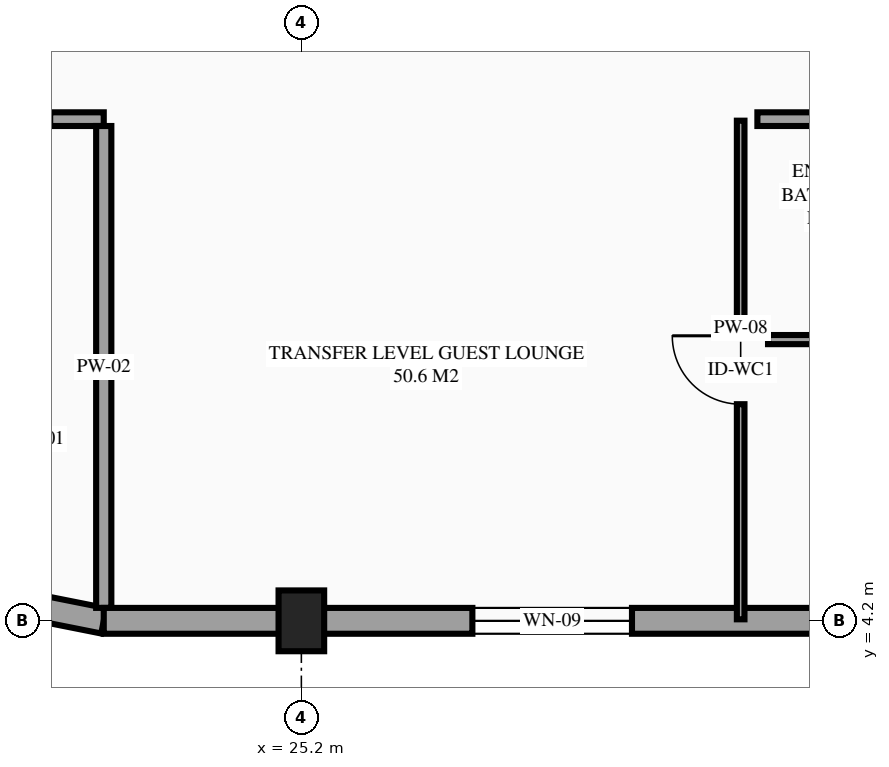
"""IFC4 building model, lengths in metres.
Left out: names, types, materials, properties, quantities, classifications, styles, units other than length and angle.
Written with IfcOpenShell. Run it as: python <this file> out.ifc"""

import sys

from ifc_helpers import new_model, si_unit, direction, frame, frame_2d, origin, origin_2d, place, context, subcontext, project, spatial, rectangle, extrude, element, fill, save


model = new_model("IFC4")
c1 = context("Model", 3, precision=1e-05, world=origin(), true_north=direction((0.0, 1.0)))
c2 = subcontext(c1, "Body", "Model", "MODEL_VIEW")
j1 = project(units=[si_unit("LENGTHUNIT", "METRE"), si_unit("PLANEANGLEUNIT", "RADIAN")], contexts=[c1])
p1 = place(None, origin())
s1 = spatial("IfcSite", under=j1, at=p1, CompositionType="ELEMENT")
p2 = place(p1, origin())
s2 = spatial("IfcBuilding", under=s1, at=p2, CompositionType="ELEMENT")
p3 = place(p2, frame((0.0, 0.0, 18.3)))
s3 = spatial("IfcBuildingStorey", under=s2, at=p3, CompositionType="ELEMENT", Elevation=18.3)
p4 = place(p3, frame((25.2, 4.2, 0.0), z_axis=(0.0, 0.0, 1.0), x_axis=(1.0, 0.0, 0.0)))
e1 = element("IfcColumn", 1, at=p4, inside=s3, PredefinedType="COLUMN", context=c2, shape_type="SweptSolid", body=[
    extrude(rectangle(XDim=0.6, YDim=0.8, at=origin_2d()), origin(), (0.0, 0.0, 1.0), 3.6),
])
p5 = place(p3, frame((20.38, 4.642, 0.0), z_axis=(0.0, 0.0, 1.0), x_axis=(0.98077519094, -0.195141038321, 0.0)))
e2 = element("IfcWall", 2, at=p5, inside=s3, PredefinedType="STANDARD", context=c2, shape_type="SweptSolid", body=[
    extrude(rectangle(XDim=2.263, YDim=0.34, at=frame_2d((1.132, 0.0))), origin(), (0.0, 0.0, 1.0), 3.126),
])
p6 = place(p3, frame((25.2, 4.2, 0.0), z_axis=(0.0, 0.0, 1.0), x_axis=(1.0, 0.0, 0.0)))
e3 = element("IfcWall", 3, at=p6, inside=s3, PredefinedType="STANDARD", context=c2, shape_type="SweptSolid", body=[
    extrude(rectangle(XDim=16.8, YDim=0.34, at=frame_2d((8.4, 0.0))), origin(), (0.0, 0.0, 1.0), 2.63),
])
p7 = place(p6, frame((9.209, 0.0, 0.85)))
e4 = element("IfcOpeningElement", 4, at=p7, cuts=e3, PredefinedType="OPENING", context=c2, shape_type="SweptSolid", body=[
    extrude(rectangle(XDim=1.5, YDim=1.5, at=frame_2d((0.75, 0.75))), frame((0.0, 0.18, 0.0), z_axis=(0.0, -1.0, 0.0), x_axis=(1.0, 0.0, 0.0)), (0.0, 0.0, 1.0), 0.36),
])
p8 = place(p6, frame((14.627, 0.0, 0.85)))
e5 = element("IfcOpeningElement", 5, at=p8, cuts=e3, PredefinedType="OPENING", context=c2, shape_type="SweptSolid", body=[
    extrude(rectangle(XDim=1.5, YDim=1.5, at=frame_2d((0.75, 0.75))), frame((0.0, 0.18, 0.0), z_axis=(0.0, -1.0, 0.0), x_axis=(1.0, 0.0, 0.0)), (0.0, 0.0, 1.0), 0.36),
])
p9 = place(p6, frame((2.25, 0.0, 0.75)))
e6 = element("IfcOpeningElement", 6, at=p9, cuts=e3, PredefinedType="OPENING", context=c2, shape_type="SweptSolid", body=[
    extrude(rectangle(XDim=2.1, YDim=1.5, at=frame_2d((1.05, 0.75))), frame((0.0, 0.18, 0.0), z_axis=(0.0, -1.0, 0.0), x_axis=(1.0, 0.0, 0.0)), (0.0, 0.0, 1.0), 0.36),
])
p10 = place(p3, frame((16.97, 10.8, 0.0), z_axis=(0.0, 0.0, 1.0), x_axis=(1.0, 0.0, 0.0)))
e7 = element("IfcWall", 7, at=p10, inside=s3, PredefinedType="PARTITIONING", context=c2, shape_type="SweptSolid", body=[
    extrude(rectangle(XDim=5.63, YDim=0.18, at=frame_2d((2.815, 0.0))), origin(), (0.0, 0.0, 1.0), 3.375),
])
p11 = place(p10, frame((3.965, 0.0, 0.0)))
e8 = element("IfcOpeningElement", 8, at=p11, cuts=e7, PredefinedType="OPENING", context=c2, shape_type="SweptSolid", body=[
    extrude(rectangle(XDim=0.96, YDim=2.15, at=frame_2d((0.48, 1.075))), frame((0.0, 0.1, 0.0), z_axis=(0.0, -1.0, 0.0), x_axis=(1.0, 0.0, 0.0)), (0.0, 0.0, 1.0), 0.2),
])
p12 = place(p3, frame((22.6, 4.37, 0.0), z_axis=(0.0, 0.0, 1.0), x_axis=(0.0, 1.0, 0.0)))
e9 = element("IfcWall", 9, at=p12, inside=s3, PredefinedType="PARTITIONING", context=c2, shape_type="SweptSolid", body=[
    extrude(rectangle(XDim=6.34, YDim=0.2, at=frame_2d((3.17, 0.0))), origin(), (0.0, 0.0, 1.0), 3.375),
])
p13 = place(p3, frame((31.2, 10.8, 0.0), z_axis=(0.0, 0.0, 1.0), x_axis=(1.0, 0.0, 0.0)))
e10 = element("IfcWall", 10, at=p13, inside=s3, PredefinedType="PARTITIONING", context=c2, shape_type="SweptSolid", body=[
    extrude(rectangle(XDim=6.418, YDim=0.18, at=frame_2d((3.209, 0.0))), origin(), (0.0, 0.0, 1.0), 3.375),
])
p14 = place(p13, frame((4.45, 0.0, 0.0)))
e11 = element("IfcOpeningElement", 11, at=p14, cuts=e10, PredefinedType="OPENING", context=c2, shape_type="SweptSolid", body=[
    extrude(rectangle(XDim=1.02, YDim=2.15, at=frame_2d((0.51, 1.075))), frame((0.0, 0.1, 0.0), z_axis=(0.0, -1.0, 0.0), x_axis=(1.0, 0.0, 0.0)), (0.0, 0.0, 1.0), 0.2),
])
p15 = place(p3, frame((31.34, 7.9, 0.0), z_axis=(0.0, 0.0, 1.0), x_axis=(1.0, 0.0, 0.0)))
e12 = element("IfcWall", 12, at=p15, inside=s3, PredefinedType="PARTITIONING", context=c2, shape_type="SweptSolid", body=[
    extrude(rectangle(XDim=2.49, YDim=0.12, at=frame_2d((1.245, 0.0))), origin(), (0.0, 0.0, 1.0), 3.375),
])
p16 = place(p3, frame((30.98, 4.22, 0.0), z_axis=(0.0, 0.0, 1.0), x_axis=(0.0, 1.0, 0.0)))
e13 = element("IfcWall", 13, at=p16, inside=s3, PredefinedType="PARTITIONING", context=c2, shape_type="SweptSolid", body=[
    extrude(rectangle(XDim=6.56, YDim=0.1, at=frame_2d((3.28, 0.0))), origin(), (0.0, 0.0, 1.0), 3.375),
])
p17 = place(p16, frame((2.83, 0.0, 0.0)))
e14 = element("IfcOpeningElement", 14, at=p17, cuts=e13, PredefinedType="OPENING", context=c2, shape_type="SweptSolid", body=[
    extrude(rectangle(XDim=0.9, YDim=2.12, at=frame_2d((0.45, 1.06))), frame((0.0, 0.06, 0.0), z_axis=(0.0, -1.0, 0.0), x_axis=(1.0, 0.0, 0.0)), (0.0, 0.0, 1.0), 0.12),
])
p18 = place(p3, frame((22.6, 4.2, 0.0), z_axis=(0.0, 0.0, 1.0), x_axis=(1.0, 0.0, 0.0)))
e15 = element("IfcWall", 15, at=p18, inside=s3, PredefinedType="STANDARD", context=c2, shape_type="SweptSolid", body=[
    extrude(rectangle(XDim=2.6, YDim=0.34, at=frame_2d((1.3, 0.0))), origin(), (0.0, 0.0, 1.0), 3.126),
])
p19 = place(p9, origin())
e16 = element("IfcWindow", 16, at=p19, inside=s3, PartitioningType="SINGLE_PANEL", PredefinedType="WINDOW", context=c2, shape_type="SweptSolid", body=[
    extrude(rectangle(XDim=2.1, YDim=1.5, at=frame_2d((1.05, 0.75))), frame((0.0, 0.03, 0.0), z_axis=(0.0, -1.0, 0.0), x_axis=(1.0, 0.0, 0.0)), (0.0, 0.0, 1.0), 0.06),
])
fill(e6, e16)
p20 = place(p17, origin())
e17 = element("IfcDoor", 17, at=p20, inside=s3, OperationType="SINGLE_SWING_RIGHT", PredefinedType="DOOR", context=c2, shape_type="SweptSolid", body=[
    extrude(rectangle(XDim=0.9, YDim=2.12, at=frame_2d((0.45, 1.06))), frame((0.0, 0.025, 0.0), z_axis=(0.0, -1.0, 0.0), x_axis=(1.0, 0.0, 0.0)), (0.0, 0.0, 1.0), 0.05),
])
fill(e14, e17)
save(model, sys.argv[1])
